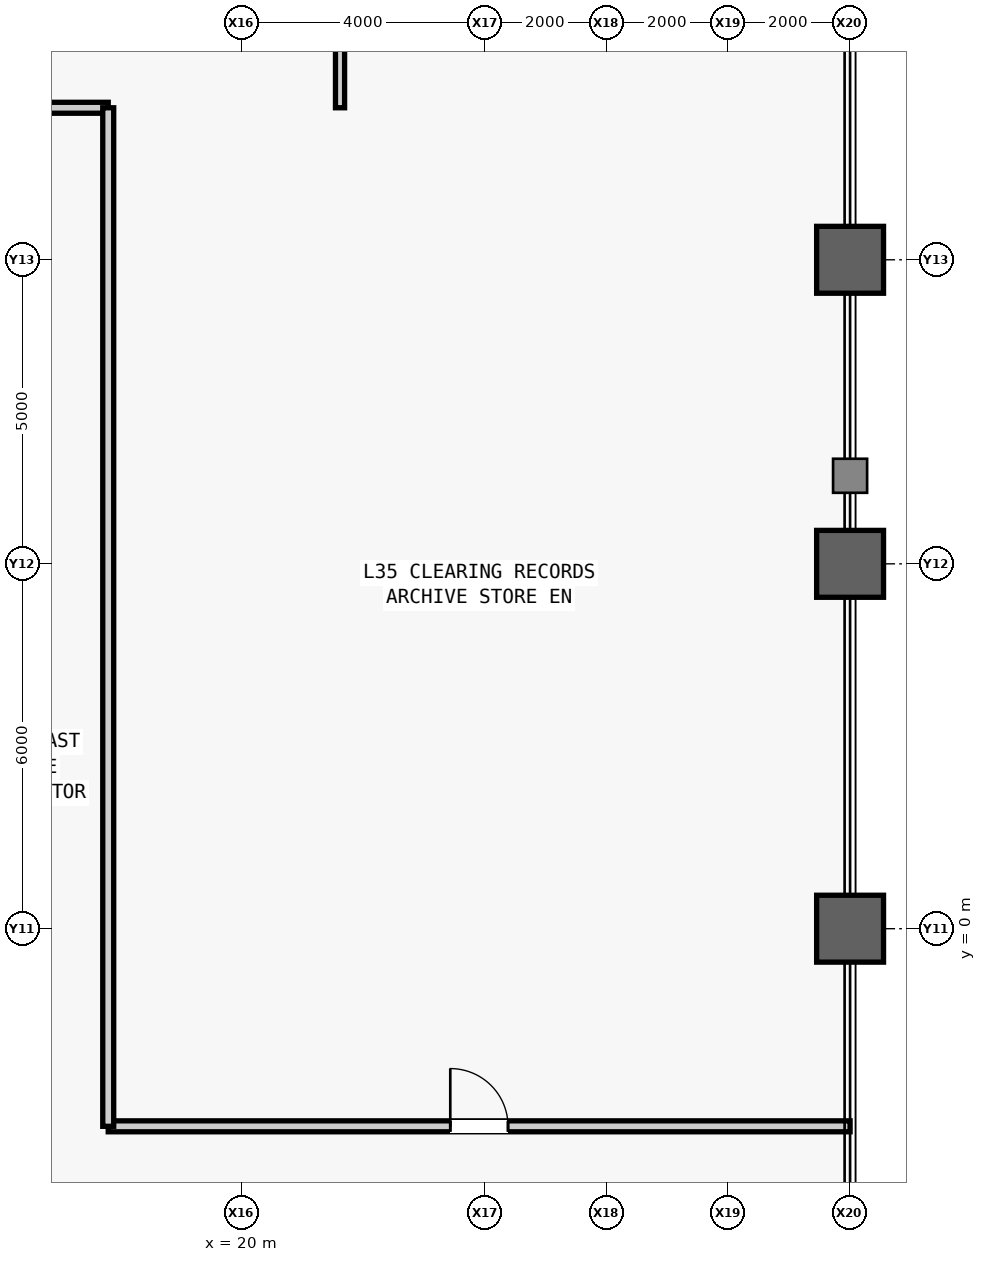
"""IFC4 building model, lengths in metres.
Left out: names, types, materials, properties, quantities, classifications, styles, units other than length and angle.
Written with IfcOpenShell. Run it as: python <this file> out.ifc"""

import sys

from ifc_helpers import new_model, si_unit, direction, frame, frame_2d, origin, origin_2d, place, context, subcontext, project, spatial, rectangle, hollow_rectangle, extrude, source, transform, mapped, element, fill, save


model = new_model("IFC4")
c1 = context("Model", 3, precision=1e-05, world=origin(), true_north=direction((0.0, 1.0)))
c2 = subcontext(c1, "Body", "Model", "MODEL_VIEW")
j1 = project(units=[si_unit("LENGTHUNIT", "METRE"), si_unit("PLANEANGLEUNIT", "RADIAN")], contexts=[c1])
p1 = place(None, origin())
s1 = spatial("IfcSite", under=j1, at=p1, CompositionType="ELEMENT")
p2 = place(p1, origin())
s2 = spatial("IfcBuilding", under=s1, at=p2, CompositionType="ELEMENT")
p3 = place(p2, frame((0.0, 0.0, 155.1)))
s3 = spatial("IfcBuildingStorey", under=s2, at=p3, CompositionType="ELEMENT", Elevation=155.1)
m1 = source(origin(), c2, "Body", "SweptSolid", [
    extrude(hollow_rectangle(XDim=1.1, YDim=1.1, WallThickness=0.06, at=origin_2d()), origin(), (0.0, 0.0, 1.0), 4.0),
])
for number, where, z_axis, x_axis in (
    (1, (30.0, 0.0, 0.0), (0.0, 0.0, 1.0), (1.0, 0.0, 0.0)),
    (2, (30.0, 6.0, 0.0), (0.0, 0.0, 1.0), (1.0, 0.0, 0.0)),
    (3, (30.0, 11.0, 0.0), (0.0, 0.0, 1.0), (1.0, 0.0, 0.0)),
):
    element("IfcColumn", number, at=place(p3, frame(where, z_axis=z_axis, x_axis=x_axis)), inside=s3, PredefinedType="COLUMN", context=c2, shape_type="MappedRepresentation", body=[
        mapped(m1, transform((0.0, 0.0, 0.0), scale=1.0)),
    ])
m2 = source(origin(), c2, "Body", "SweptSolid", [
    extrude(rectangle(XDim=2.45, YDim=0.18, at=frame_2d((1.225, 0.0))), origin(), (0.0, 0.0, 1.0), 3.78),
])
p4 = place(p3, frame((15.35, 13.5, 0.0), z_axis=(0.0, 0.0, 1.0), x_axis=(1.0, 0.0, 0.0)))
e4 = element("IfcWall", 4, at=p4, inside=s3, PredefinedType="PARTITIONING", context=c2, shape_type="MappedRepresentation", body=[
    mapped(m2, transform((0.0, 0.0, 0.0), scale=1.0)),
])
m3 = source(origin(), c2, "Body", "SweptSolid", [
    extrude(rectangle(XDim=16.5, YDim=0.15, at=frame_2d((8.25, 0.0))), origin(), (0.0, 0.0, 1.0), 3.78),
])
p5 = place(p3, frame((21.612, 13.5, 0.0), z_axis=(0.0, 0.0, 1.0), x_axis=(0.0, 1.0, 0.0)))
e5 = element("IfcWall", 5, at=p5, inside=s3, PredefinedType="PARTITIONING", context=c2, shape_type="MappedRepresentation", body=[
    mapped(m3, transform((0.0, 0.0, 0.0), scale=1.0)),
])
m4 = source(origin(), c2, "Body", "SweptSolid", [
    extrude(rectangle(XDim=0.95, YDim=2.15, at=frame_2d((0.475, 1.075))), frame((0.0, 0.085, 0.0), z_axis=(0.0, -1.0, 0.0), x_axis=(1.0, 0.0, 0.0)), (0.0, 0.0, 1.0), 0.17),
])
p6 = place(p5, frame((11.9, 0.0, 0.0)))
e6 = element("IfcOpeningElement", 6, at=p6, cuts=e5, PredefinedType="OPENING", context=c2, shape_type="MappedRepresentation", body=[
    mapped(m4, transform((0.0, 0.0, 0.0), scale=1.0)),
])
m5 = source(origin(), c2, "Body", "SweptSolid", [
    extrude(rectangle(XDim=12.2, YDim=0.18, at=frame_2d((6.1, 0.0))), origin(), (0.0, 0.0, 1.0), 3.78),
])
p7 = place(p3, frame((17.8, -3.25, 0.0), z_axis=(0.0, 0.0, 1.0), x_axis=(1.0, 0.0, 0.0)))
e7 = element("IfcWall", 7, at=p7, inside=s3, PredefinedType="PARTITIONING", context=c2, shape_type="MappedRepresentation", body=[
    mapped(m5, transform((0.0, 0.0, 0.0), scale=1.0)),
])
m6 = source(origin(), c2, "Body", "SweptSolid", [
    extrude(rectangle(XDim=0.95, YDim=2.15, at=frame_2d((0.475, 1.075))), frame((0.0, 0.1, 0.0), z_axis=(0.0, -1.0, 0.0), x_axis=(1.0, 0.0, 0.0)), (0.0, 0.0, 1.0), 0.2),
])
p8 = place(p7, frame((5.625, 0.0, 0.0)))
e8 = element("IfcOpeningElement", 8, at=p8, cuts=e7, PredefinedType="OPENING", context=c2, shape_type="MappedRepresentation", body=[
    mapped(m6, transform((0.0, 0.0, 0.0), scale=1.0)),
])
m7 = source(origin(), c2, "Body", "SweptSolid", [
    extrude(rectangle(XDim=16.75, YDim=0.18, at=frame_2d((8.375, 0.0))), origin(), (0.0, 0.0, 1.0), 3.78),
])
p9 = place(p3, frame((17.8, -3.25, 0.0), z_axis=(0.0, 0.0, 1.0), x_axis=(0.0, 1.0, 0.0)))
e9 = element("IfcWall", 9, at=p9, inside=s3, PredefinedType="PARTITIONING", context=c2, shape_type="MappedRepresentation", body=[
    mapped(m7, transform((0.0, 0.0, 0.0), scale=1.0)),
])
m8 = source(origin(), c2, "Body", "SweptSolid", [
    extrude(rectangle(XDim=0.95, YDim=2.15, at=frame_2d((0.475, 1.075))), frame((0.0, 0.025, 0.0), z_axis=(0.0, -1.0, 0.0), x_axis=(1.0, 0.0, 0.0)), (0.0, 0.0, 1.0), 0.05),
])
p10 = place(p8, origin())
e10 = element("IfcDoor", 10, at=p10, inside=s3, OperationType="SINGLE_SWING_LEFT", PredefinedType="DOOR", context=c2, shape_type="MappedRepresentation", body=[
    mapped(m8, transform((0.0, 0.0, 0.0), scale=1.0)),
])
fill(e8, e10)
save(model, sys.argv[1])
